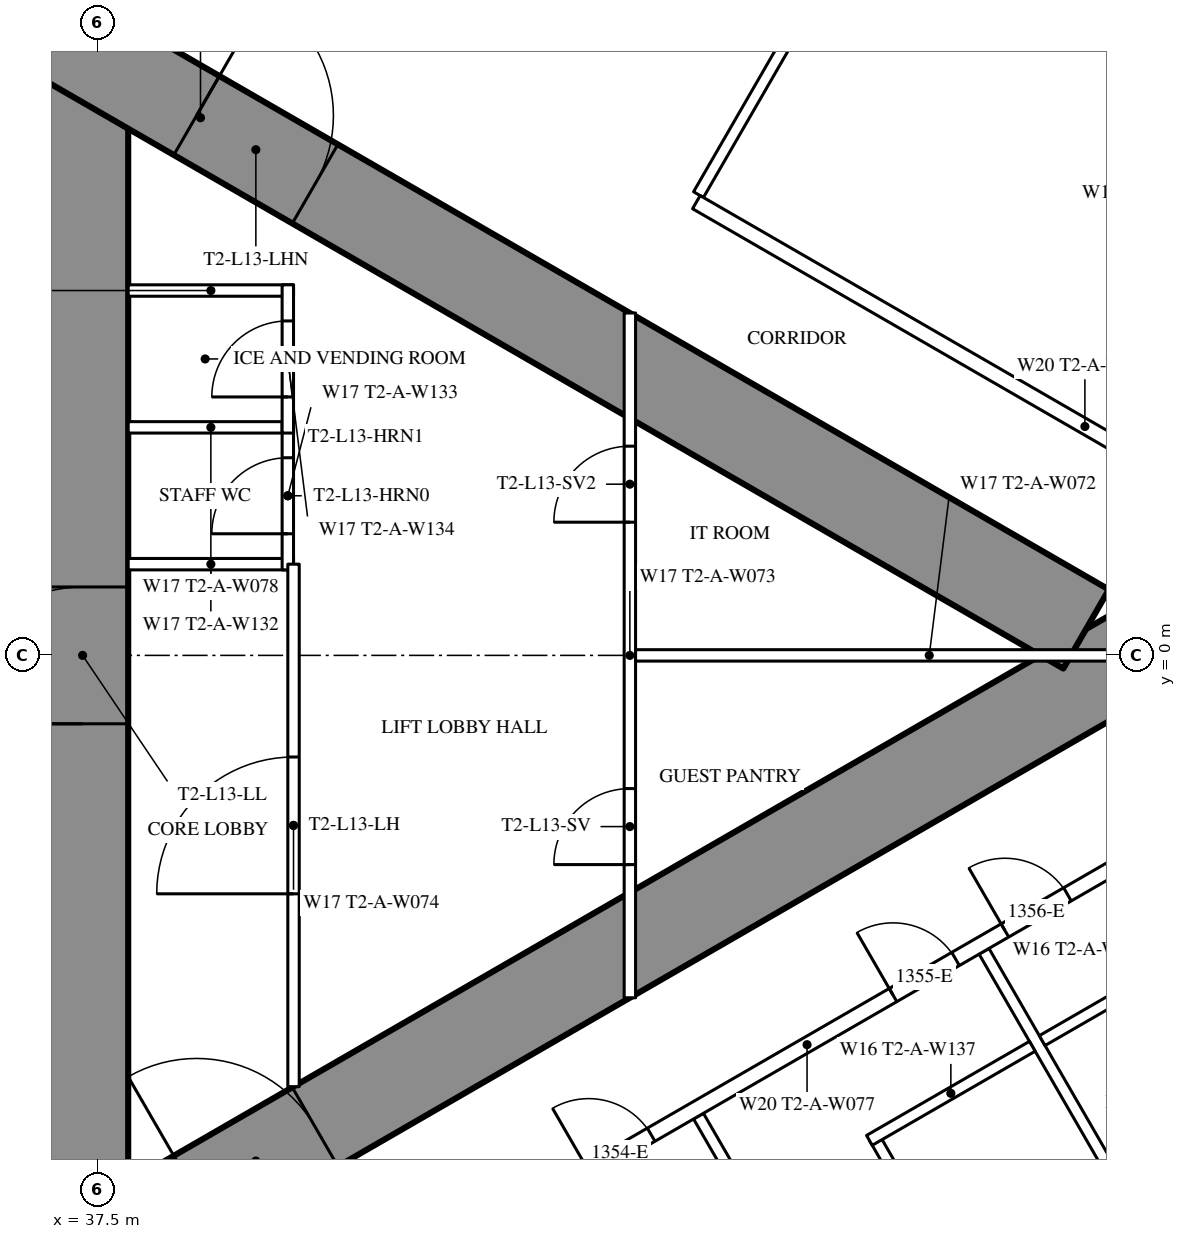
"""IFC4 building model, lengths in metres.
Left out: names, types, materials, properties, quantities, classifications, styles, units other than length and angle.
Written with IfcOpenShell. Run it as: python <this file> out.ifc"""

import sys

from ifc_helpers import new_model, si_unit, direction, frame, frame_2d, origin, place, context, subcontext, project, spatial, rectangle, extrude, element, fill, save


model = new_model("IFC4")
c1 = context("Model", 3, precision=1e-05, world=origin(), true_north=direction((0.0, 1.0)))
c2 = subcontext(c1, "Body", "Model", "MODEL_VIEW")
j1 = project(units=[si_unit("LENGTHUNIT", "METRE"), si_unit("PLANEANGLEUNIT", "RADIAN")], contexts=[c1])
p1 = place(None, origin())
s1 = spatial("IfcSite", under=j1, at=p1, CompositionType="ELEMENT")
p2 = place(p1, origin())
s2 = spatial("IfcBuilding", under=s1, at=p2, CompositionType="ELEMENT")
p3 = place(p2, frame((0.0, 0.0, 53.0)))
s3 = spatial("IfcBuildingStorey", under=s2, at=p3, CompositionType="ELEMENT", Elevation=53.0)
p4 = place(p3, frame((37.3, -8.6, 0.0), z_axis=(0.0, 0.0, 1.0), x_axis=(0.0, 1.0, 0.0)))
e1 = element("IfcWall", 1, at=p4, inside=s3, PredefinedType="SHEAR", context=c2, shape_type="SweptSolid", body=[
    extrude(rectangle(XDim=17.2, YDim=1.2, at=frame_2d((8.6, 0.0))), origin(), (0.0, 0.0, 1.0), 3.5),
])
p5 = place(p4, frame((7.7, 0.0, 0.0)))
e2 = element("IfcOpeningElement", 2, at=p5, cuts=e1, PredefinedType="OPENING", context=c2, shape_type="SweptSolid", body=[
    extrude(rectangle(XDim=1.8, YDim=2.2, at=frame_2d((0.9, 1.1))), frame((0.0, 0.61, 0.0), z_axis=(0.0, -1.0, 0.0), x_axis=(1.0, 0.0, 0.0)), (0.0, 0.0, 1.0), 1.22),
])
p6 = place(p3, frame((27.2, -13.8, 0.0), z_axis=(0.0, 0.0, 1.0), x_axis=(0.866027159892, 0.499996958321, 0.0)))
e3 = element("IfcWall", 3, at=p6, inside=s3, PredefinedType="SHEAR", context=c2, shape_type="SweptSolid", body=[
    extrude(rectangle(XDim=27.947, YDim=1.2, at=frame_2d((13.973, 0.0))), origin(), (0.0, 0.0, 1.0), 3.5),
])
p7 = place(p6, frame((4.6, 0.0, 0.0)))
e4 = element("IfcOpeningElement", 4, at=p7, cuts=e3, PredefinedType="OPENING", context=c2, shape_type="SweptSolid", body=[
    extrude(rectangle(XDim=1.0, YDim=2.2, at=frame_2d((0.5, 1.1))), frame((0.0, 0.61, 0.0), z_axis=(0.0, -1.0, 0.0), x_axis=(1.0, 0.0, 0.0)), (0.0, 0.0, 1.0), 1.22),
])
p8 = place(p6, frame((13.395, 0.0, 0.0)))
e5 = element("IfcOpeningElement", 5, at=p8, cuts=e3, PredefinedType="OPENING", context=c2, shape_type="SweptSolid", body=[
    extrude(rectangle(XDim=1.8, YDim=2.2, at=frame_2d((0.9, 1.1))), frame((0.0, 0.61, 0.0), z_axis=(0.0, -1.0, 0.0), x_axis=(1.0, 0.0, 0.0)), (0.0, 0.0, 1.0), 1.22),
])
p9 = place(p3, frame((27.2, 13.8, 0.0), z_axis=(0.0, 0.0, 1.0), x_axis=(0.866024515034, -0.500001539357, 0.0)))
e6 = element("IfcWall", 6, at=p9, inside=s3, PredefinedType="SHEAR", context=c2, shape_type="SweptSolid", body=[
    extrude(rectangle(XDim=26.907, YDim=1.2, at=frame_2d((13.454, 0.0))), origin(), (0.0, 0.0, 1.0), 3.5),
])
p10 = place(p9, frame((4.6, 0.0, 0.0)))
e7 = element("IfcOpeningElement", 7, at=p10, cuts=e6, PredefinedType="OPENING", context=c2, shape_type="SweptSolid", body=[
    extrude(rectangle(XDim=1.0, YDim=2.2, at=frame_2d((0.5, 1.1))), frame((0.0, 0.61, 0.0), z_axis=(0.0, -1.0, 0.0), x_axis=(1.0, 0.0, 0.0)), (0.0, 0.0, 1.0), 1.22),
])
p11 = place(p9, frame((13.395, 0.0, 0.0)))
e8 = element("IfcOpeningElement", 8, at=p11, cuts=e6, PredefinedType="OPENING", context=c2, shape_type="SweptSolid", body=[
    extrude(rectangle(XDim=1.8, YDim=2.2, at=frame_2d((0.9, 1.1))), frame((0.0, 0.61, 0.0), z_axis=(0.0, -1.0, 0.0), x_axis=(1.0, 0.0, 0.0)), (0.0, 0.0, 1.0), 1.22),
])
p12 = place(p3, frame((45.403, -6.062, 0.0), z_axis=(0.0, 0.0, 1.0), x_axis=(0.500007077968, -0.866021317279, 0.0)))
e9 = element("IfcWall", 9, at=p12, inside=s3, PredefinedType="PARTITIONING", context=c2, shape_type="SweptSolid", body=[
    extrude(rectangle(XDim=12.721, YDim=0.15, at=frame_2d((6.361, 0.0))), origin(), (0.0, 0.0, 1.0), 3.25),
])
p13 = place(p3, frame((49.159, -3.893, 0.0), z_axis=(0.0, 0.0, 1.0), x_axis=(0.499998773722, -0.866026111775, 0.0)))
e10 = element("IfcWall", 10, at=p13, inside=s3, PredefinedType="PARTITIONING", context=c2, shape_type="SweptSolid", body=[
    extrude(rectangle(XDim=9.892, YDim=0.15, at=frame_2d((4.946, 0.0))), origin(), (0.0, 0.0, 1.0), 2.25),
])
p14 = place(p3, frame((45.403, 6.062, 0.0), z_axis=(0.0, 0.0, 1.0), x_axis=(0.500013434677, 0.866017647131, 0.0)))
e11 = element("IfcWall", 11, at=p14, inside=s3, PredefinedType="PARTITIONING", context=c2, shape_type="SweptSolid", body=[
    extrude(rectangle(XDim=9.902, YDim=0.15, at=frame_2d((4.951, 0.0))), origin(), (0.0, 0.0, 1.0), 2.25),
])
p15 = place(p3, frame((37.96, -10.243, 0.0), z_axis=(0.0, 0.0, 1.0), x_axis=(0.866026429433, 0.499998223521, 0.0)))
e12 = element("IfcWall", 12, at=p15, inside=s3, PredefinedType="PARTITIONING", context=c2, shape_type="SweptSolid", body=[
    extrude(rectangle(XDim=20.487, YDim=0.2, at=frame_2d((10.243, 0.0))), origin(), (0.0, 0.0, 1.0), 3.25),
])
p16 = place(p15, frame((6.925, 0.0, 0.0)))
e13 = element("IfcOpeningElement", 13, at=p16, cuts=e12, PredefinedType="OPENING", context=c2, shape_type="SweptSolid", body=[
    extrude(rectangle(XDim=0.95, YDim=2.2, at=frame_2d((0.475, 1.1))), frame((0.0, 0.11, 0.0), z_axis=(0.0, -1.0, 0.0), x_axis=(1.0, 0.0, 0.0)), (0.0, 0.0, 1.0), 0.22),
])
p17 = place(p15, frame((11.549, 0.0, 0.0)))
e14 = element("IfcOpeningElement", 14, at=p17, cuts=e12, PredefinedType="OPENING", context=c2, shape_type="SweptSolid", body=[
    extrude(rectangle(XDim=0.95, YDim=2.2, at=frame_2d((0.475, 1.1))), frame((0.0, 0.11, 0.0), z_axis=(0.0, -1.0, 0.0), x_axis=(1.0, 0.0, 0.0)), (0.0, 0.0, 1.0), 0.22),
])
p18 = place(p15, frame((13.249, 0.0, 0.0)))
e15 = element("IfcOpeningElement", 15, at=p18, cuts=e12, PredefinedType="OPENING", context=c2, shape_type="SweptSolid", body=[
    extrude(rectangle(XDim=0.95, YDim=2.2, at=frame_2d((0.475, 1.1))), frame((0.0, 0.11, 0.0), z_axis=(0.0, -1.0, 0.0), x_axis=(1.0, 0.0, 0.0)), (0.0, 0.0, 1.0), 0.22),
])
p19 = place(p15, frame((17.585, 0.0, 0.0)))
e16 = element("IfcOpeningElement", 16, at=p19, cuts=e12, PredefinedType="OPENING", context=c2, shape_type="SweptSolid", body=[
    extrude(rectangle(XDim=0.95, YDim=2.2, at=frame_2d((0.475, 1.1))), frame((0.0, 0.11, 0.0), z_axis=(0.0, -1.0, 0.0), x_axis=(1.0, 0.0, 0.0)), (0.0, 0.0, 1.0), 0.22),
])
p20 = place(p15, frame((0.6, 0.0, 0.0)))
e17 = element("IfcOpeningElement", 17, at=p20, cuts=e12, PredefinedType="OPENING", context=c2, shape_type="SweptSolid", body=[
    extrude(rectangle(XDim=0.95, YDim=2.2, at=frame_2d((0.475, 1.1))), frame((0.0, 0.11, 0.0), z_axis=(0.0, -1.0, 0.0), x_axis=(1.0, 0.0, 0.0)), (0.0, 0.0, 1.0), 0.22),
])
p21 = place(p3, frame((45.375, 5.963, 0.0), z_axis=(0.0, 0.0, 1.0), x_axis=(0.86603164725, -0.499989185844, 0.0)))
e18 = element("IfcWall", 18, at=p21, inside=s3, PredefinedType="PARTITIONING", context=c2, shape_type="SweptSolid", body=[
    extrude(rectangle(XDim=11.805, YDim=0.2, at=frame_2d((5.903, 0.0))), origin(), (0.0, 0.0, 1.0), 3.25),
])
p22 = place(p21, frame((9.024, 0.0, 0.0)))
e19 = element("IfcOpeningElement", 19, at=p22, cuts=e18, PredefinedType="OPENING", context=c2, shape_type="SweptSolid", body=[
    extrude(rectangle(XDim=0.95, YDim=2.2, at=frame_2d((0.475, 1.1))), frame((0.0, 0.11, 0.0), z_axis=(0.0, -1.0, 0.0), x_axis=(1.0, 0.0, 0.0)), (0.0, 0.0, 1.0), 0.22),
])
p23 = place(p21, frame((7.324, 0.0, 0.0)))
e20 = element("IfcOpeningElement", 20, at=p23, cuts=e18, PredefinedType="OPENING", context=c2, shape_type="SweptSolid", body=[
    extrude(rectangle(XDim=0.95, YDim=2.2, at=frame_2d((0.475, 1.1))), frame((0.0, 0.11, 0.0), z_axis=(0.0, -1.0, 0.0), x_axis=(1.0, 0.0, 0.0)), (0.0, 0.0, 1.0), 0.22),
])
p24 = place(p3, frame((47.716, -6.343, 0.0), z_axis=(0.0, 0.0, 1.0), x_axis=(0.500006934395, -0.866021400173, 0.0)))
e21 = element("IfcWall", 21, at=p24, inside=s3, PredefinedType="PARTITIONING", context=c2, shape_type="SweptSolid", body=[
    extrude(rectangle(XDim=2.6, YDim=0.15, at=frame_2d((1.3, 0.0))), origin(), (0.0, 0.0, 1.0), 3.25),
])
p25 = place(p24, frame((0.9, 0.0, 0.0)))
e22 = element("IfcOpeningElement", 22, at=p25, cuts=e21, PredefinedType="OPENING", context=c2, shape_type="SweptSolid", body=[
    extrude(rectangle(XDim=0.8, YDim=2.2, at=frame_2d((0.4, 1.1))), frame((0.0, 0.085, 0.0), z_axis=(0.0, -1.0, 0.0), x_axis=(1.0, 0.0, 0.0)), (0.0, 0.0, 1.0), 0.17),
])
p26 = place(p3, frame((47.651, -6.38, 0.0), z_axis=(0.0, 0.0, 1.0), x_axis=(0.866031185235, 0.4999899861, 0.0)))
e23 = element("IfcWall", 23, at=p26, inside=s3, PredefinedType="PARTITIONING", context=c2, shape_type="SweptSolid", body=[
    extrude(rectangle(XDim=2.475, YDim=0.15, at=frame_2d((1.238, 0.0))), origin(), (0.0, 0.0, 1.0), 3.25),
])
p27 = place(p3, frame((49.925, -5.068, 0.0), z_axis=(0.0, 0.0, 1.0), x_axis=(0.866006523861, 0.500032699561, 0.0)))
e24 = element("IfcWall", 24, at=p27, inside=s3, PredefinedType="PARTITIONING", context=c2, shape_type="SweptSolid", body=[
    extrude(rectangle(XDim=2.475, YDim=0.15, at=frame_2d((1.237, 0.0))), origin(), (0.0, 0.0, 1.0), 3.25),
])
for number, where, z_axis, x_axis in (
    (25, (37.9, 1.2, 0.0), (0.0, 0.0, 1.0), (1.0, 0.0, 0.0)),
    (26, (37.9, 3.0, 0.0), (0.0, 0.0, 1.0), (1.0, 0.0, 0.0)),
    (27, (37.9, 4.8, 0.0), (0.0, 0.0, 1.0), (1.0, 0.0, 0.0)),
):
    element("IfcWall", number, at=place(p3, frame(where, z_axis=z_axis, x_axis=x_axis)), inside=s3, PredefinedType="PARTITIONING", context=c2, shape_type="SweptSolid", body=[
        extrude(rectangle(XDim=2.175, YDim=0.15, at=frame_2d((1.087, 0.0))), origin(), (0.0, 0.0, 1.0), 3.25),
    ])
p28 = place(p3, frame((40.0, 1.125, 0.0), z_axis=(0.0, 0.0, 1.0), x_axis=(0.0, 1.0, 0.0)))
e28 = element("IfcWall", 28, at=p28, inside=s3, PredefinedType="PARTITIONING", context=c2, shape_type="SweptSolid", body=[
    extrude(rectangle(XDim=1.95, YDim=0.15, at=frame_2d((0.975, 0.0))), origin(), (0.0, 0.0, 1.0), 3.25),
])
p29 = place(p28, frame((0.475, 0.0, 0.0)))
e29 = element("IfcOpeningElement", 29, at=p29, cuts=e28, PredefinedType="OPENING", context=c2, shape_type="SweptSolid", body=[
    extrude(rectangle(XDim=1.0, YDim=2.2, at=frame_2d((0.5, 1.1))), frame((0.0, 0.085, 0.0), z_axis=(0.0, -1.0, 0.0), x_axis=(1.0, 0.0, 0.0)), (0.0, 0.0, 1.0), 0.17),
])
p30 = place(p3, frame((40.0, 2.925, 0.0), z_axis=(0.0, 0.0, 1.0), x_axis=(0.0, 1.0, 0.0)))
e30 = element("IfcWall", 30, at=p30, inside=s3, PredefinedType="PARTITIONING", context=c2, shape_type="SweptSolid", body=[
    extrude(rectangle(XDim=1.95, YDim=0.15, at=frame_2d((0.975, 0.0))), origin(), (0.0, 0.0, 1.0), 3.25),
])
p31 = place(p30, frame((0.475, 0.0, 0.0)))
e31 = element("IfcOpeningElement", 31, at=p31, cuts=e30, PredefinedType="OPENING", context=c2, shape_type="SweptSolid", body=[
    extrude(rectangle(XDim=1.0, YDim=2.2, at=frame_2d((0.5, 1.1))), frame((0.0, 0.085, 0.0), z_axis=(0.0, -1.0, 0.0), x_axis=(1.0, 0.0, 0.0)), (0.0, 0.0, 1.0), 0.17),
])
p32 = place(p3, frame((40.075, -5.674, 0.0), z_axis=(0.0, 0.0, 1.0), x_axis=(0.0, 1.0, 0.0)))
e32 = element("IfcWall", 32, at=p32, inside=s3, PredefinedType="PARTITIONING", context=c2, shape_type="SweptSolid", body=[
    extrude(rectangle(XDim=6.874, YDim=0.15, at=frame_2d((3.437, 0.0))), origin(), (0.0, 0.0, 1.0), 3.25),
])
p33 = place(p32, frame((2.537, 0.0, 0.0)))
e33 = element("IfcOpeningElement", 33, at=p33, cuts=e32, PredefinedType="OPENING", context=c2, shape_type="SweptSolid", body=[
    extrude(rectangle(XDim=1.8, YDim=2.2, at=frame_2d((0.9, 1.1))), frame((0.0, 0.085, 0.0), z_axis=(0.0, -1.0, 0.0), x_axis=(1.0, 0.0, 0.0)), (0.0, 0.0, 1.0), 0.17),
])
p34 = place(p3, frame((44.5, -4.505, 0.0), z_axis=(0.0, 0.0, 1.0), x_axis=(0.0, 1.0, 0.0)))
e34 = element("IfcWall", 34, at=p34, inside=s3, PredefinedType="PARTITIONING", context=c2, shape_type="SweptSolid", body=[
    extrude(rectangle(XDim=9.009, YDim=0.15, at=frame_2d((4.505, 0.0))), origin(), (0.0, 0.0, 1.0), 2.45),
])
p35 = place(p34, frame((1.752, 0.0, 0.0)))
e35 = element("IfcOpeningElement", 35, at=p35, cuts=e34, PredefinedType="OPENING", context=c2, shape_type="SweptSolid", body=[
    extrude(rectangle(XDim=1.0, YDim=2.2, at=frame_2d((0.5, 1.1))), frame((0.0, 0.085, 0.0), z_axis=(0.0, -1.0, 0.0), x_axis=(1.0, 0.0, 0.0)), (0.0, 0.0, 1.0), 0.17),
])
p36 = place(p34, frame((6.257, 0.0, 0.0)))
e36 = element("IfcOpeningElement", 36, at=p36, cuts=e34, PredefinedType="OPENING", context=c2, shape_type="SweptSolid", body=[
    extrude(rectangle(XDim=1.0, YDim=2.2, at=frame_2d((0.5, 1.1))), frame((0.0, 0.085, 0.0), z_axis=(0.0, -1.0, 0.0), x_axis=(1.0, 0.0, 0.0)), (0.0, 0.0, 1.0), 0.17),
])
p37 = place(p3, frame((44.575, 0.0, 0.0), z_axis=(0.0, 0.0, 1.0), x_axis=(1.0, 0.0, 0.0)))
e37 = element("IfcWall", 37, at=p37, inside=s3, PredefinedType="PARTITIONING", context=c2, shape_type="SweptSolid", body=[
    extrude(rectangle(XDim=7.727, YDim=0.15, at=frame_2d((3.864, 0.0))), origin(), (0.0, 0.0, 1.0), 2.25),
])
p38 = place(p16, origin())
e38 = element("IfcDoor", 38, at=p38, inside=s3, OperationType="SINGLE_SWING_LEFT", PredefinedType="DOOR", context=c2, shape_type="SweptSolid", body=[
    extrude(rectangle(XDim=0.95, YDim=2.2, at=frame_2d((0.475, 1.1))), frame((0.0, 0.025, 0.0), z_axis=(0.0, -1.0, 0.0), x_axis=(1.0, 0.0, 0.0)), (0.0, 0.0, 1.0), 0.05),
])
fill(e13, e38)
p39 = place(p17, origin())
e39 = element("IfcDoor", 39, at=p39, inside=s3, OperationType="SINGLE_SWING_LEFT", PredefinedType="DOOR", context=c2, shape_type="SweptSolid", body=[
    extrude(rectangle(XDim=0.95, YDim=2.2, at=frame_2d((0.475, 1.1))), frame((0.0, 0.025, 0.0), z_axis=(0.0, -1.0, 0.0), x_axis=(1.0, 0.0, 0.0)), (0.0, 0.0, 1.0), 0.05),
])
fill(e14, e39)
p40 = place(p18, origin())
e40 = element("IfcDoor", 40, at=p40, inside=s3, OperationType="SINGLE_SWING_LEFT", PredefinedType="DOOR", context=c2, shape_type="SweptSolid", body=[
    extrude(rectangle(XDim=0.95, YDim=2.2, at=frame_2d((0.475, 1.1))), frame((0.0, 0.025, 0.0), z_axis=(0.0, -1.0, 0.0), x_axis=(1.0, 0.0, 0.0)), (0.0, 0.0, 1.0), 0.05),
])
fill(e15, e40)
p41 = place(p29, origin())
e41 = element("IfcDoor", 41, at=p41, inside=s3, OperationType="SINGLE_SWING_LEFT", PredefinedType="DOOR", context=c2, shape_type="SweptSolid", body=[
    extrude(rectangle(XDim=1.0, YDim=2.2, at=frame_2d((0.5, 1.1))), frame((0.0, 0.025, 0.0), z_axis=(0.0, -1.0, 0.0), x_axis=(1.0, 0.0, 0.0)), (0.0, 0.0, 1.0), 0.05),
])
fill(e29, e41)
p42 = place(p31, origin())
e42 = element("IfcDoor", 42, at=p42, inside=s3, OperationType="SINGLE_SWING_LEFT", PredefinedType="DOOR", context=c2, shape_type="SweptSolid", body=[
    extrude(rectangle(XDim=1.0, YDim=2.2, at=frame_2d((0.5, 1.1))), frame((0.0, 0.025, 0.0), z_axis=(0.0, -1.0, 0.0), x_axis=(1.0, 0.0, 0.0)), (0.0, 0.0, 1.0), 0.05),
])
fill(e31, e42)
p43 = place(p33, origin())
e43 = element("IfcDoor", 43, at=p43, inside=s3, OperationType="DOUBLE_DOOR_SINGLE_SWING", PredefinedType="DOOR", context=c2, shape_type="SweptSolid", body=[
    extrude(rectangle(XDim=1.8, YDim=2.2, at=frame_2d((0.9, 1.1))), frame((0.0, 0.025, 0.0), z_axis=(0.0, -1.0, 0.0), x_axis=(1.0, 0.0, 0.0)), (0.0, 0.0, 1.0), 0.05),
])
fill(e33, e43)
p44 = place(p35, origin())
e44 = element("IfcDoor", 44, at=p44, inside=s3, OperationType="SINGLE_SWING_LEFT", PredefinedType="DOOR", context=c2, shape_type="SweptSolid", body=[
    extrude(rectangle(XDim=1.0, YDim=2.2, at=frame_2d((0.5, 1.1))), frame((0.0, 0.025, 0.0), z_axis=(0.0, -1.0, 0.0), x_axis=(1.0, 0.0, 0.0)), (0.0, 0.0, 1.0), 0.05),
])
fill(e35, e44)
p45 = place(p36, origin())
e45 = element("IfcDoor", 45, at=p45, inside=s3, OperationType="SINGLE_SWING_LEFT", PredefinedType="DOOR", context=c2, shape_type="SweptSolid", body=[
    extrude(rectangle(XDim=1.0, YDim=2.2, at=frame_2d((0.5, 1.1))), frame((0.0, 0.025, 0.0), z_axis=(0.0, -1.0, 0.0), x_axis=(1.0, 0.0, 0.0)), (0.0, 0.0, 1.0), 0.05),
])
fill(e36, e45)
p46 = place(p8, origin())
e46 = element("IfcDoor", 46, at=p46, inside=s3, OperationType="DOUBLE_DOOR_SINGLE_SWING", PredefinedType="DOOR", context=c2, shape_type="SweptSolid", body=[
    extrude(rectangle(XDim=1.8, YDim=2.2, at=frame_2d((0.9, 1.1))), frame((0.0, 0.025, 0.0), z_axis=(0.0, -1.0, 0.0), x_axis=(1.0, 0.0, 0.0)), (0.0, 0.0, 1.0), 0.05),
])
fill(e5, e46)
p47 = place(p11, origin())
e47 = element("IfcDoor", 47, at=p47, inside=s3, OperationType="DOUBLE_DOOR_SINGLE_SWING", PredefinedType="DOOR", context=c2, shape_type="SweptSolid", body=[
    extrude(rectangle(XDim=1.8, YDim=2.2, at=frame_2d((0.9, 1.1))), frame((0.0, 0.025, 0.0), z_axis=(0.0, -1.0, 0.0), x_axis=(1.0, 0.0, 0.0)), (0.0, 0.0, 1.0), 0.05),
])
fill(e8, e47)
p48 = place(p5, origin())
e48 = element("IfcDoor", 48, at=p48, inside=s3, OperationType="DOUBLE_DOOR_SINGLE_SWING", PredefinedType="DOOR", context=c2, shape_type="SweptSolid", body=[
    extrude(rectangle(XDim=1.8, YDim=2.2, at=frame_2d((0.9, 1.1))), frame((0.0, 0.025, 0.0), z_axis=(0.0, -1.0, 0.0), x_axis=(1.0, 0.0, 0.0)), (0.0, 0.0, 1.0), 0.05),
])
fill(e2, e48)
save(model, sys.argv[1])
